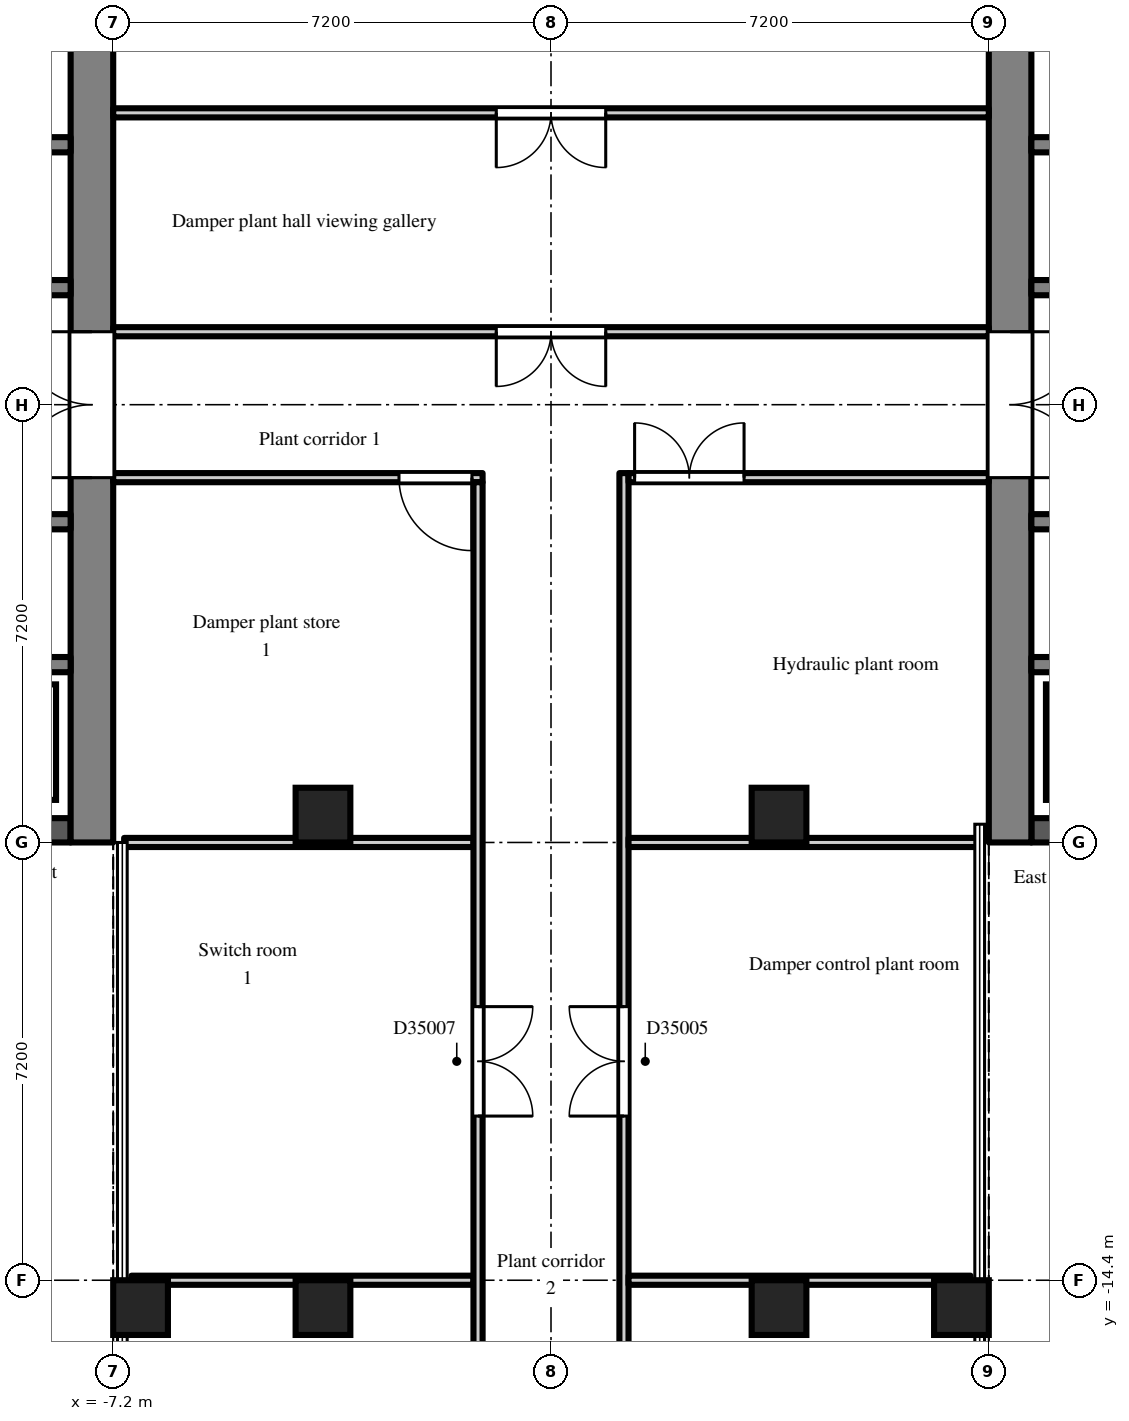
"""IFC4 building model, lengths in metres.
Left out: names, types, materials, properties, quantities, classifications, styles, units other than length and angle.
Written with IfcOpenShell. Run it as: python <this file> out.ifc"""

import sys

from ifc_helpers import new_model, si_unit, direction, frame, frame_2d, origin, origin_2d, place, context, subcontext, project, spatial, rectangle, extrude, element, fill, save


model = new_model("IFC4")
c1 = context("Model", 3, precision=1e-05, world=origin(), true_north=direction((0.0, 1.0)))
c2 = subcontext(c1, "Body", "Model", "MODEL_VIEW")
j1 = project(units=[si_unit("LENGTHUNIT", "METRE"), si_unit("PLANEANGLEUNIT", "RADIAN")], contexts=[c1])
p1 = place(None, origin())
s1 = spatial("IfcSite", under=j1, at=p1, CompositionType="ELEMENT")
p2 = place(p1, origin())
s2 = spatial("IfcBuilding", under=s1, at=p2, CompositionType="ELEMENT")
p3 = place(p2, frame((0.0, 0.0, 242.1)))
s3 = spatial("IfcBuildingStorey", under=s2, at=p3, CompositionType="ELEMENT", Elevation=242.1)
for number, where, z_axis, x_axis in (
    (1, (-6.75, -14.85, 0.0), (0.0, 0.0, 1.0), (1.0, 0.0, 0.0)),
    (2, (-3.75, -14.85, 0.0), (0.0, 0.0, 1.0), (1.0, 0.0, 0.0)),
    (3, (-3.75, -6.75, 0.0), (0.0, 0.0, 1.0), (1.0, 0.0, 0.0)),
    (4, (3.75, -14.85, 0.0), (0.0, 0.0, 1.0), (1.0, 0.0, 0.0)),
    (5, (3.75, -6.75, 0.0), (0.0, 0.0, 1.0), (1.0, 0.0, 0.0)),
    (6, (6.75, -14.85, 0.0), (0.0, 0.0, 1.0), (1.0, 0.0, 0.0)),
):
    element("IfcColumn", number, at=place(p3, frame(where, z_axis=z_axis, x_axis=x_axis)), inside=s3, PredefinedType="COLUMN", context=c2, shape_type="SweptSolid", body=[
        extrude(rectangle(XDim=0.9, YDim=0.9, at=origin_2d()), origin(), (0.0, 0.0, 1.0), 5.4),
    ])
p4 = place(p3, frame((7.55, -7.2, 0.0), z_axis=(0.0, 0.0, 1.0), x_axis=(0.0, 1.0, 0.0)))
e7 = element("IfcWall", 7, at=p4, inside=s3, PredefinedType="SHEAR", context=c2, shape_type="SweptSolid", body=[
    extrude(rectangle(XDim=14.4, YDim=0.7, at=frame_2d((7.2, 0.0))), origin(), (0.0, 0.0, 1.0), 4.95),
])
p5 = place(p4, frame((6.0, 0.0, 0.0)))
e8 = element("IfcOpeningElement", 8, at=p5, cuts=e7, PredefinedType="OPENING", context=c2, shape_type="SweptSolid", body=[
    extrude(rectangle(XDim=2.4, YDim=2.2, at=frame_2d((1.2, 1.1))), frame((0.0, 0.36, 0.0), z_axis=(0.0, -1.0, 0.0), x_axis=(1.0, 0.0, 0.0)), (0.0, 0.0, 1.0), 0.72),
])
p6 = place(p3, frame((7.9, 1.925, 0.0), z_axis=(0.0, 0.0, 1.0), x_axis=(1.0, 0.0, 0.0)))
e9 = element("IfcWall", 9, at=p6, inside=s3, PredefinedType="SHEAR", context=c2, shape_type="SweptSolid", body=[
    extrude(rectangle(XDim=12.95, YDim=0.25, at=frame_2d((6.475, 0.0))), origin(), (0.0, 0.0, 1.0), 4.95),
])
p7 = place(p6, frame((0.525, 0.0, 0.0)))
e10 = element("IfcOpeningElement", 10, at=p7, cuts=e9, PredefinedType="OPENING", context=c2, shape_type="SweptSolid", body=[
    extrude(rectangle(XDim=0.9, YDim=2.1, at=frame_2d((0.45, 1.05))), frame((0.0, 0.135, 0.0), z_axis=(0.0, -1.0, 0.0), x_axis=(1.0, 0.0, 0.0)), (0.0, 0.0, 1.0), 0.27),
])
p8 = place(p6, frame((2.625, 0.0, 0.0)))
e11 = element("IfcOpeningElement", 11, at=p8, cuts=e9, PredefinedType="OPENING", context=c2, shape_type="SweptSolid", body=[
    extrude(rectangle(XDim=1.1, YDim=2.1, at=frame_2d((0.55, 1.05))), frame((0.0, 0.135, 0.0), z_axis=(0.0, -1.0, 0.0), x_axis=(1.0, 0.0, 0.0)), (0.0, 0.0, 1.0), 0.27),
])
p9 = place(p6, frame((11.525, 0.0, 0.0)))
e12 = element("IfcOpeningElement", 12, at=p9, cuts=e9, PredefinedType="OPENING", context=c2, shape_type="SweptSolid", body=[
    extrude(rectangle(XDim=0.9, YDim=2.1, at=frame_2d((0.45, 1.05))), frame((0.0, 0.135, 0.0), z_axis=(0.0, -1.0, 0.0), x_axis=(1.0, 0.0, 0.0)), (0.0, 0.0, 1.0), 0.27),
])
p10 = place(p3, frame((7.9, 4.275, 0.0), z_axis=(0.0, 0.0, 1.0), x_axis=(1.0, 0.0, 0.0)))
e13 = element("IfcWall", 13, at=p10, inside=s3, PredefinedType="SHEAR", context=c2, shape_type="SweptSolid", body=[
    extrude(rectangle(XDim=1.95, YDim=0.25, at=frame_2d((0.975, 0.0))), origin(), (0.0, 0.0, 1.0), 4.95),
])
p11 = place(p3, frame((7.9, -7.0, 0.0), z_axis=(0.0, 0.0, 1.0), x_axis=(1.0, 0.0, 0.0)))
e14 = element("IfcWall", 14, at=p11, inside=s3, PredefinedType="SHEAR", context=c2, shape_type="SweptSolid", body=[
    extrude(rectangle(XDim=12.95, YDim=0.4, at=frame_2d((6.475, 0.0))), origin(), (0.0, 0.0, 1.0), 4.95),
])
p12 = place(p3, frame((7.9, -1.925, 0.0), z_axis=(0.0, 0.0, 1.0), x_axis=(1.0, 0.0, 0.0)))
e15 = element("IfcWall", 15, at=p12, inside=s3, PredefinedType="SHEAR", context=c2, shape_type="SweptSolid", body=[
    extrude(rectangle(XDim=12.95, YDim=0.25, at=frame_2d((6.475, 0.0))), origin(), (0.0, 0.0, 1.0), 4.95),
])
p13 = place(p12, frame((0.525, 0.0, 0.0)))
e16 = element("IfcOpeningElement", 16, at=p13, cuts=e15, PredefinedType="OPENING", context=c2, shape_type="SweptSolid", body=[
    extrude(rectangle(XDim=0.9, YDim=2.1, at=frame_2d((0.45, 1.05))), frame((0.0, 0.135, 0.0), z_axis=(0.0, -1.0, 0.0), x_axis=(1.0, 0.0, 0.0)), (0.0, 0.0, 1.0), 0.27),
])
p14 = place(p12, frame((2.625, 0.0, 0.0)))
e17 = element("IfcOpeningElement", 17, at=p14, cuts=e15, PredefinedType="OPENING", context=c2, shape_type="SweptSolid", body=[
    extrude(rectangle(XDim=1.1, YDim=2.1, at=frame_2d((0.55, 1.05))), frame((0.0, 0.135, 0.0), z_axis=(0.0, -1.0, 0.0), x_axis=(1.0, 0.0, 0.0)), (0.0, 0.0, 1.0), 0.27),
])
p15 = place(p12, frame((6.025, 0.0, 0.0)))
e18 = element("IfcOpeningElement", 18, at=p15, cuts=e15, PredefinedType="OPENING", context=c2, shape_type="SweptSolid", body=[
    extrude(rectangle(XDim=0.9, YDim=2.1, at=frame_2d((0.45, 1.05))), frame((0.0, 0.135, 0.0), z_axis=(0.0, -1.0, 0.0), x_axis=(1.0, 0.0, 0.0)), (0.0, 0.0, 1.0), 0.27),
])
p16 = place(p12, frame((10.425, 0.0, 0.0)))
e19 = element("IfcOpeningElement", 19, at=p16, cuts=e15, PredefinedType="OPENING", context=c2, shape_type="SweptSolid", body=[
    extrude(rectangle(XDim=0.9, YDim=2.1, at=frame_2d((0.45, 1.05))), frame((0.0, 0.135, 0.0), z_axis=(0.0, -1.0, 0.0), x_axis=(1.0, 0.0, 0.0)), (0.0, 0.0, 1.0), 0.27),
])
p17 = place(p3, frame((7.9, -4.275, 0.0), z_axis=(0.0, 0.0, 1.0), x_axis=(1.0, 0.0, 0.0)))
e20 = element("IfcWall", 20, at=p17, inside=s3, PredefinedType="SHEAR", context=c2, shape_type="SweptSolid", body=[
    extrude(rectangle(XDim=1.95, YDim=0.25, at=frame_2d((0.975, 0.0))), origin(), (0.0, 0.0, 1.0), 4.95),
])
p18 = place(p3, frame((-7.55, -7.2, 0.0), z_axis=(0.0, 0.0, 1.0), x_axis=(0.0, 1.0, 0.0)))
e21 = element("IfcWall", 21, at=p18, inside=s3, PredefinedType="SHEAR", context=c2, shape_type="SweptSolid", body=[
    extrude(rectangle(XDim=14.4, YDim=0.7, at=frame_2d((7.2, 0.0))), origin(), (0.0, 0.0, 1.0), 4.95),
])
p19 = place(p18, frame((6.0, 0.0, 0.0)))
e22 = element("IfcOpeningElement", 22, at=p19, cuts=e21, PredefinedType="OPENING", context=c2, shape_type="SweptSolid", body=[
    extrude(rectangle(XDim=2.4, YDim=2.2, at=frame_2d((1.2, 1.1))), frame((0.0, 0.36, 0.0), z_axis=(0.0, -1.0, 0.0), x_axis=(1.0, 0.0, 0.0)), (0.0, 0.0, 1.0), 0.72),
])
p20 = place(p3, frame((-7.9, 1.925, 0.0), z_axis=(0.0, 0.0, 1.0), x_axis=(-1.0, 0.0, 0.0)))
e23 = element("IfcWall", 23, at=p20, inside=s3, PredefinedType="SHEAR", context=c2, shape_type="SweptSolid", body=[
    extrude(rectangle(XDim=12.95, YDim=0.25, at=frame_2d((6.475, 0.0))), origin(), (0.0, 0.0, 1.0), 4.95),
])
p21 = place(p20, frame((0.525, 0.0, 0.0)))
e24 = element("IfcOpeningElement", 24, at=p21, cuts=e23, PredefinedType="OPENING", context=c2, shape_type="SweptSolid", body=[
    extrude(rectangle(XDim=0.9, YDim=2.1, at=frame_2d((0.45, 1.05))), frame((0.0, 0.135, 0.0), z_axis=(0.0, -1.0, 0.0), x_axis=(1.0, 0.0, 0.0)), (0.0, 0.0, 1.0), 0.27),
])
p22 = place(p20, frame((2.625, 0.0, 0.0)))
e25 = element("IfcOpeningElement", 25, at=p22, cuts=e23, PredefinedType="OPENING", context=c2, shape_type="SweptSolid", body=[
    extrude(rectangle(XDim=1.1, YDim=2.1, at=frame_2d((0.55, 1.05))), frame((0.0, 0.135, 0.0), z_axis=(0.0, -1.0, 0.0), x_axis=(1.0, 0.0, 0.0)), (0.0, 0.0, 1.0), 0.27),
])
p23 = place(p20, frame((11.525, 0.0, 0.0)))
e26 = element("IfcOpeningElement", 26, at=p23, cuts=e23, PredefinedType="OPENING", context=c2, shape_type="SweptSolid", body=[
    extrude(rectangle(XDim=0.9, YDim=2.1, at=frame_2d((0.45, 1.05))), frame((0.0, 0.135, 0.0), z_axis=(0.0, -1.0, 0.0), x_axis=(1.0, 0.0, 0.0)), (0.0, 0.0, 1.0), 0.27),
])
p24 = place(p3, frame((-7.9, 4.275, 0.0), z_axis=(0.0, 0.0, 1.0), x_axis=(-1.0, 0.0, 0.0)))
e27 = element("IfcWall", 27, at=p24, inside=s3, PredefinedType="SHEAR", context=c2, shape_type="SweptSolid", body=[
    extrude(rectangle(XDim=1.95, YDim=0.25, at=frame_2d((0.975, 0.0))), origin(), (0.0, 0.0, 1.0), 4.95),
])
p25 = place(p3, frame((-7.9, -7.0, 0.0), z_axis=(0.0, 0.0, 1.0), x_axis=(-1.0, 0.0, 0.0)))
e28 = element("IfcWall", 28, at=p25, inside=s3, PredefinedType="SHEAR", context=c2, shape_type="SweptSolid", body=[
    extrude(rectangle(XDim=12.95, YDim=0.4, at=frame_2d((6.475, 0.0))), origin(), (0.0, 0.0, 1.0), 4.95),
])
p26 = place(p3, frame((-7.9, -1.925, 0.0), z_axis=(0.0, 0.0, 1.0), x_axis=(-1.0, 0.0, 0.0)))
e29 = element("IfcWall", 29, at=p26, inside=s3, PredefinedType="SHEAR", context=c2, shape_type="SweptSolid", body=[
    extrude(rectangle(XDim=12.95, YDim=0.25, at=frame_2d((6.475, 0.0))), origin(), (0.0, 0.0, 1.0), 4.95),
])
p27 = place(p26, frame((0.525, 0.0, 0.0)))
e30 = element("IfcOpeningElement", 30, at=p27, cuts=e29, PredefinedType="OPENING", context=c2, shape_type="SweptSolid", body=[
    extrude(rectangle(XDim=0.9, YDim=2.1, at=frame_2d((0.45, 1.05))), frame((0.0, 0.135, 0.0), z_axis=(0.0, -1.0, 0.0), x_axis=(1.0, 0.0, 0.0)), (0.0, 0.0, 1.0), 0.27),
])
p28 = place(p26, frame((2.625, 0.0, 0.0)))
e31 = element("IfcOpeningElement", 31, at=p28, cuts=e29, PredefinedType="OPENING", context=c2, shape_type="SweptSolid", body=[
    extrude(rectangle(XDim=1.1, YDim=2.1, at=frame_2d((0.55, 1.05))), frame((0.0, 0.135, 0.0), z_axis=(0.0, -1.0, 0.0), x_axis=(1.0, 0.0, 0.0)), (0.0, 0.0, 1.0), 0.27),
])
p29 = place(p26, frame((6.025, 0.0, 0.0)))
e32 = element("IfcOpeningElement", 32, at=p29, cuts=e29, PredefinedType="OPENING", context=c2, shape_type="SweptSolid", body=[
    extrude(rectangle(XDim=0.9, YDim=2.1, at=frame_2d((0.45, 1.05))), frame((0.0, 0.135, 0.0), z_axis=(0.0, -1.0, 0.0), x_axis=(1.0, 0.0, 0.0)), (0.0, 0.0, 1.0), 0.27),
])
p30 = place(p26, frame((10.425, 0.0, 0.0)))
e33 = element("IfcOpeningElement", 33, at=p30, cuts=e29, PredefinedType="OPENING", context=c2, shape_type="SweptSolid", body=[
    extrude(rectangle(XDim=0.9, YDim=2.1, at=frame_2d((0.45, 1.05))), frame((0.0, 0.135, 0.0), z_axis=(0.0, -1.0, 0.0), x_axis=(1.0, 0.0, 0.0)), (0.0, 0.0, 1.0), 0.27),
])
p31 = place(p3, frame((-7.9, -4.275, 0.0), z_axis=(0.0, 0.0, 1.0), x_axis=(-1.0, 0.0, 0.0)))
e34 = element("IfcWall", 34, at=p31, inside=s3, PredefinedType="SHEAR", context=c2, shape_type="SweptSolid", body=[
    extrude(rectangle(XDim=1.95, YDim=0.25, at=frame_2d((0.975, 0.0))), origin(), (0.0, 0.0, 1.0), 4.95),
])
p32 = place(p3, frame((-7.2, -1.2, 0.0), z_axis=(0.0, 0.0, 1.0), x_axis=(1.0, 0.0, 0.0)))
e35 = element("IfcWall", 35, at=p32, inside=s3, PredefinedType="PARTITIONING", context=c2, shape_type="SweptSolid", body=[
    extrude(rectangle(XDim=6.075, YDim=0.15, at=frame_2d((3.038, 0.0))), origin(), (0.0, 0.0, 1.0), 4.95),
])
p33 = place(p32, frame((4.7, 0.0, 0.0)))
e36 = element("IfcOpeningElement", 36, at=p33, cuts=e35, PredefinedType="OPENING", context=c2, shape_type="SweptSolid", body=[
    extrude(rectangle(XDim=1.2, YDim=2.1, at=frame_2d((0.6, 1.05))), frame((0.0, 0.085, 0.0), z_axis=(0.0, -1.0, 0.0), x_axis=(1.0, 0.0, 0.0)), (0.0, 0.0, 1.0), 0.17),
])
p34 = place(p3, frame((-7.2, 1.2, 0.0), z_axis=(0.0, 0.0, 1.0), x_axis=(1.0, 0.0, 0.0)))
e37 = element("IfcWall", 37, at=p34, inside=s3, PredefinedType="PARTITIONING", context=c2, shape_type="SweptSolid", body=[
    extrude(rectangle(XDim=14.4, YDim=0.15, at=frame_2d((7.2, 0.0))), origin(), (0.0, 0.0, 1.0), 4.95),
])
p35 = place(p34, frame((6.3, 0.0, 0.0)))
e38 = element("IfcOpeningElement", 38, at=p35, cuts=e37, PredefinedType="OPENING", context=c2, shape_type="SweptSolid", body=[
    extrude(rectangle(XDim=1.8, YDim=2.1, at=frame_2d((0.9, 1.05))), frame((0.0, 0.085, 0.0), z_axis=(0.0, -1.0, 0.0), x_axis=(1.0, 0.0, 0.0)), (0.0, 0.0, 1.0), 0.17),
])
p36 = place(p3, frame((-7.2, 4.8, 0.0), z_axis=(0.0, 0.0, 1.0), x_axis=(1.0, 0.0, 0.0)))
e39 = element("IfcWall", 39, at=p36, inside=s3, PredefinedType="PARTITIONING", context=c2, shape_type="SweptSolid", body=[
    extrude(rectangle(XDim=14.4, YDim=0.15, at=frame_2d((7.2, 0.0))), origin(), (0.0, 0.0, 1.0), 4.95),
])
p37 = place(p36, frame((6.3, 0.0, 0.0)))
e40 = element("IfcOpeningElement", 40, at=p37, cuts=e39, PredefinedType="OPENING", context=c2, shape_type="SweptSolid", body=[
    extrude(rectangle(XDim=1.8, YDim=2.1, at=frame_2d((0.9, 1.05))), frame((0.0, 0.085, 0.0), z_axis=(0.0, -1.0, 0.0), x_axis=(1.0, 0.0, 0.0)), (0.0, 0.0, 1.0), 0.17),
])
p38 = place(p3, frame((-6.9, -14.4, 0.0), z_axis=(0.0, 0.0, 1.0), x_axis=(1.0, 0.0, 0.0)))
e41 = element("IfcWall", 41, at=p38, inside=s3, PredefinedType="PARTITIONING", context=c2, shape_type="SweptSolid", body=[
    extrude(rectangle(XDim=5.625, YDim=0.15, at=frame_2d((2.812, 0.0))), origin(), (0.0, 0.0, 1.0), 4.95),
])
p39 = place(p3, frame((-7.02, -7.2, 0.0), z_axis=(0.0, 0.0, 1.0), x_axis=(1.0, 0.0, 0.0)))
e42 = element("IfcWall", 42, at=p39, inside=s3, PredefinedType="PARTITIONING", context=c2, shape_type="SweptSolid", body=[
    extrude(rectangle(XDim=5.745, YDim=0.15, at=frame_2d((2.873, 0.0))), origin(), (0.0, 0.0, 1.0), 4.95),
])
p40 = place(p3, frame((-1.2, -21.42, 0.0), z_axis=(0.0, 0.0, 1.0), x_axis=(0.0, 1.0, 0.0)))
e43 = element("IfcWall", 43, at=p40, inside=s3, PredefinedType="PARTITIONING", context=c2, shape_type="SweptSolid", body=[
    extrude(rectangle(XDim=20.145, YDim=0.15, at=frame_2d((10.073, 0.0))), origin(), (0.0, 0.0, 1.0), 4.95),
])
p41 = place(p40, frame((9.72, 0.0, 0.0)))
e44 = element("IfcOpeningElement", 44, at=p41, cuts=e43, PredefinedType="OPENING", context=c2, shape_type="SweptSolid", body=[
    extrude(rectangle(XDim=1.8, YDim=2.1, at=frame_2d((0.9, 1.05))), frame((0.0, 0.085, 0.0), z_axis=(0.0, -1.0, 0.0), x_axis=(1.0, 0.0, 0.0)), (0.0, 0.0, 1.0), 0.17),
])
p42 = place(p40, frame((2.67, 0.0, 0.0)))
e45 = element("IfcOpeningElement", 45, at=p42, cuts=e43, PredefinedType="OPENING", context=c2, shape_type="SweptSolid", body=[
    extrude(rectangle(XDim=1.8, YDim=2.1, at=frame_2d((0.9, 1.05))), frame((0.0, 0.085, 0.0), z_axis=(0.0, -1.0, 0.0), x_axis=(1.0, 0.0, 0.0)), (0.0, 0.0, 1.0), 0.17),
])
p43 = place(p3, frame((1.2, -21.42, 0.0), z_axis=(0.0, 0.0, 1.0), x_axis=(0.0, 1.0, 0.0)))
e46 = element("IfcWall", 46, at=p43, inside=s3, PredefinedType="PARTITIONING", context=c2, shape_type="SweptSolid", body=[
    extrude(rectangle(XDim=20.295, YDim=0.15, at=frame_2d((10.147, 0.0))), origin(), (0.0, 0.0, 1.0), 4.95),
])
p44 = place(p43, frame((9.72, 0.0, 0.0)))
e47 = element("IfcOpeningElement", 47, at=p44, cuts=e46, PredefinedType="OPENING", context=c2, shape_type="SweptSolid", body=[
    extrude(rectangle(XDim=1.8, YDim=2.1, at=frame_2d((0.9, 1.05))), frame((0.0, 0.085, 0.0), z_axis=(0.0, -1.0, 0.0), x_axis=(1.0, 0.0, 0.0)), (0.0, 0.0, 1.0), 0.17),
])
p45 = place(p43, frame((2.67, 0.0, 0.0)))
e48 = element("IfcOpeningElement", 48, at=p45, cuts=e46, PredefinedType="OPENING", context=c2, shape_type="SweptSolid", body=[
    extrude(rectangle(XDim=1.8, YDim=2.1, at=frame_2d((0.9, 1.05))), frame((0.0, 0.085, 0.0), z_axis=(0.0, -1.0, 0.0), x_axis=(1.0, 0.0, 0.0)), (0.0, 0.0, 1.0), 0.17),
])
p46 = place(p3, frame((1.275, -14.4, 0.0), z_axis=(0.0, 0.0, 1.0), x_axis=(1.0, 0.0, 0.0)))
e49 = element("IfcWall", 49, at=p46, inside=s3, PredefinedType="PARTITIONING", context=c2, shape_type="SweptSolid", body=[
    extrude(rectangle(XDim=5.625, YDim=0.15, at=frame_2d((2.812, 0.0))), origin(), (0.0, 0.0, 1.0), 4.95),
])
p47 = place(p3, frame((1.275, -7.2, 0.0), z_axis=(0.0, 0.0, 1.0), x_axis=(1.0, 0.0, 0.0)))
e50 = element("IfcWall", 50, at=p47, inside=s3, PredefinedType="PARTITIONING", context=c2, shape_type="SweptSolid", body=[
    extrude(rectangle(XDim=5.745, YDim=0.15, at=frame_2d((2.873, 0.0))), origin(), (0.0, 0.0, 1.0), 4.95),
])
p48 = place(p3, frame((1.275, -1.2, 0.0), z_axis=(0.0, 0.0, 1.0), x_axis=(1.0, 0.0, 0.0)))
e51 = element("IfcWall", 51, at=p48, inside=s3, PredefinedType="PARTITIONING", context=c2, shape_type="SweptSolid", body=[
    extrude(rectangle(XDim=5.925, YDim=0.15, at=frame_2d((2.962, 0.0))), origin(), (0.0, 0.0, 1.0), 4.95),
])
p49 = place(p48, frame((0.1, 0.0, 0.0)))
e52 = element("IfcOpeningElement", 52, at=p49, cuts=e51, PredefinedType="OPENING", context=c2, shape_type="SweptSolid", body=[
    extrude(rectangle(XDim=1.8, YDim=2.1, at=frame_2d((0.9, 1.05))), frame((0.0, 0.085, 0.0), z_axis=(0.0, -1.0, 0.0), x_axis=(1.0, 0.0, 0.0)), (0.0, 0.0, 1.0), 0.17),
])
p50 = place(p5, frame((2.4, 0.0, 0.0), z_axis=(0.0, 0.0, 1.0), x_axis=(-1.0, 0.0, 0.0)))
e53 = element("IfcDoor", 53, at=p50, inside=s3, OperationType="DOUBLE_DOOR_DOUBLE_SWING", PredefinedType="DOOR", context=c2, shape_type="SweptSolid", body=[
    extrude(rectangle(XDim=2.4, YDim=2.2, at=frame_2d((1.2, 1.1))), frame((0.0, 0.025, 0.0), z_axis=(0.0, -1.0, 0.0), x_axis=(1.0, 0.0, 0.0)), (0.0, 0.0, 1.0), 0.05),
])
fill(e8, e53)
p51 = place(p19, origin())
e54 = element("IfcDoor", 54, at=p51, inside=s3, OperationType="DOUBLE_DOOR_DOUBLE_SWING", PredefinedType="DOOR", context=c2, shape_type="SweptSolid", body=[
    extrude(rectangle(XDim=2.4, YDim=2.2, at=frame_2d((1.2, 1.1))), frame((0.0, 0.025, 0.0), z_axis=(0.0, -1.0, 0.0), x_axis=(1.0, 0.0, 0.0)), (0.0, 0.0, 1.0), 0.05),
])
fill(e22, e54)
p52 = place(p35, frame((1.8, 0.0, 0.0), z_axis=(0.0, 0.0, 1.0), x_axis=(-1.0, 0.0, 0.0)))
e55 = element("IfcDoor", 55, at=p52, inside=s3, OperationType="DOUBLE_DOOR_DOUBLE_SWING", PredefinedType="DOOR", context=c2, shape_type="SweptSolid", body=[
    extrude(rectangle(XDim=1.8, YDim=2.1, at=frame_2d((0.9, 1.05))), frame((0.0, 0.025, 0.0), z_axis=(0.0, -1.0, 0.0), x_axis=(1.0, 0.0, 0.0)), (0.0, 0.0, 1.0), 0.05),
])
fill(e38, e55)
p53 = place(p37, frame((1.8, 0.0, 0.0), z_axis=(0.0, 0.0, 1.0), x_axis=(-1.0, 0.0, 0.0)))
e56 = element("IfcDoor", 56, at=p53, inside=s3, OperationType="DOUBLE_DOOR_DOUBLE_SWING", PredefinedType="DOOR", context=c2, shape_type="SweptSolid", body=[
    extrude(rectangle(XDim=1.8, YDim=2.1, at=frame_2d((0.9, 1.05))), frame((0.0, 0.025, 0.0), z_axis=(0.0, -1.0, 0.0), x_axis=(1.0, 0.0, 0.0)), (0.0, 0.0, 1.0), 0.05),
])
fill(e40, e56)
p54 = place(p33, frame((1.2, 0.0, 0.0), z_axis=(0.0, 0.0, 1.0), x_axis=(-1.0, 0.0, 0.0)))
e57 = element("IfcDoor", 57, at=p54, inside=s3, OperationType="SINGLE_SWING_LEFT", PredefinedType="DOOR", context=c2, shape_type="SweptSolid", body=[
    extrude(rectangle(XDim=1.2, YDim=2.1, at=frame_2d((0.6, 1.05))), frame((0.0, 0.025, 0.0), z_axis=(0.0, -1.0, 0.0), x_axis=(1.0, 0.0, 0.0)), (0.0, 0.0, 1.0), 0.05),
])
fill(e36, e57)
p55 = place(p49, origin())
e58 = element("IfcDoor", 58, at=p55, inside=s3, OperationType="DOUBLE_DOOR_DOUBLE_SWING", PredefinedType="DOOR", context=c2, shape_type="SweptSolid", body=[
    extrude(rectangle(XDim=1.8, YDim=2.1, at=frame_2d((0.9, 1.05))), frame((0.0, 0.025, 0.0), z_axis=(0.0, -1.0, 0.0), x_axis=(1.0, 0.0, 0.0)), (0.0, 0.0, 1.0), 0.05),
])
fill(e52, e58)
p56 = place(p44, origin())
e59 = element("IfcDoor", 59, at=p56, inside=s3, OperationType="DOUBLE_DOOR_DOUBLE_SWING", PredefinedType="DOOR", context=c2, shape_type="SweptSolid", body=[
    extrude(rectangle(XDim=1.8, YDim=2.1, at=frame_2d((0.9, 1.05))), frame((0.0, 0.025, 0.0), z_axis=(0.0, -1.0, 0.0), x_axis=(1.0, 0.0, 0.0)), (0.0, 0.0, 1.0), 0.05),
])
fill(e47, e59)
p57 = place(p41, frame((1.8, 0.0, 0.0), z_axis=(0.0, 0.0, 1.0), x_axis=(-1.0, 0.0, 0.0)))
e60 = element("IfcDoor", 60, at=p57, inside=s3, OperationType="DOUBLE_DOOR_DOUBLE_SWING", PredefinedType="DOOR", context=c2, shape_type="SweptSolid", body=[
    extrude(rectangle(XDim=1.8, YDim=2.1, at=frame_2d((0.9, 1.05))), frame((0.0, 0.025, 0.0), z_axis=(0.0, -1.0, 0.0), x_axis=(1.0, 0.0, 0.0)), (0.0, 0.0, 1.0), 0.05),
])
fill(e44, e60)
save(model, sys.argv[1])
